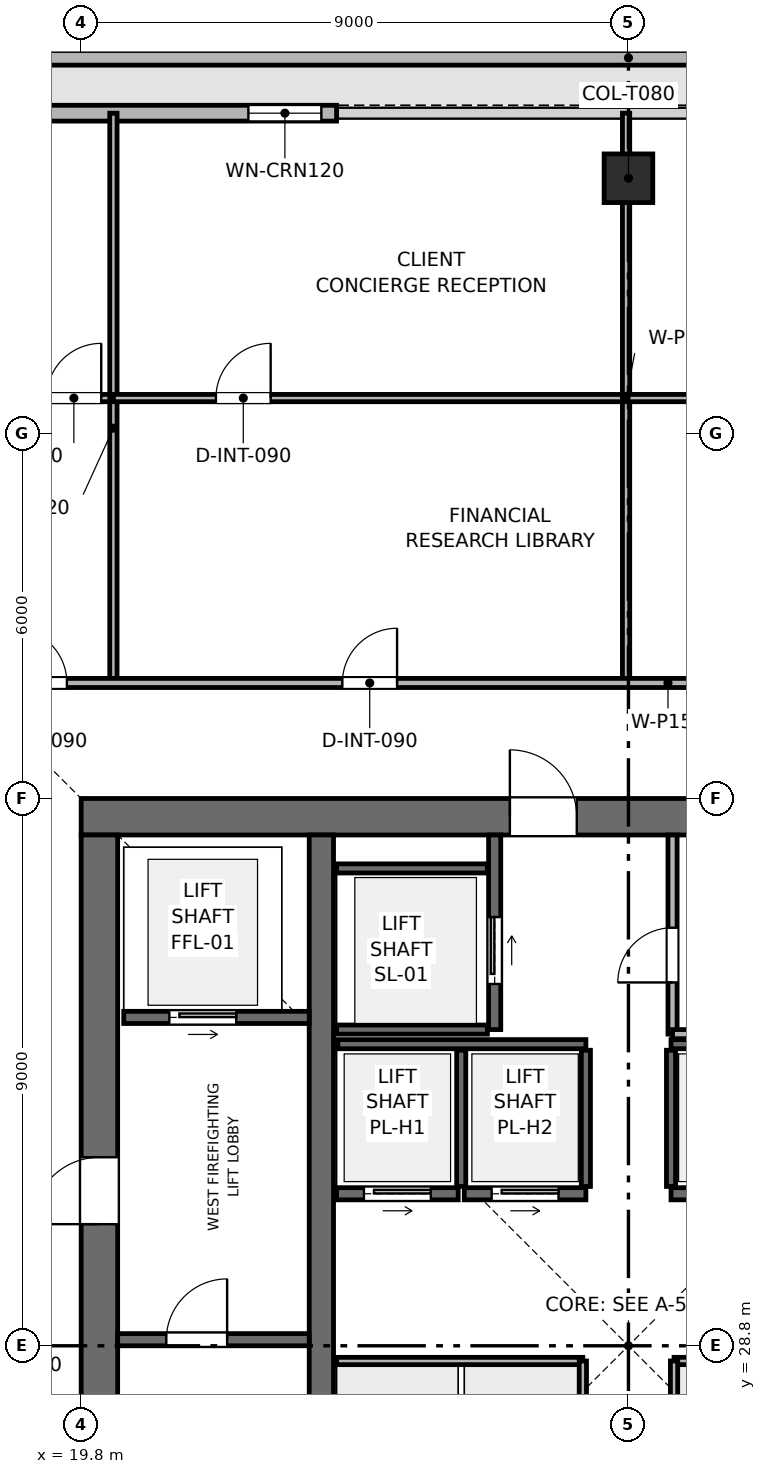
"""IFC4 building model, lengths in metres.
Left out: names, types, materials, properties, quantities, classifications, styles, units other than length and angle.
Written with IfcOpenShell. Run it as: python <this file> out.ifc"""

import sys

from ifc_helpers import new_model, si_unit, direction, frame, frame_2d, origin, origin_2d, place, context, subcontext, project, spatial, rectangle, extrude, element, fill, save


model = new_model("IFC4")
c1 = context("Model", 3, precision=1e-05, world=origin(), true_north=direction((0.0, 1.0)))
c2 = subcontext(c1, "Body", "Model", "MODEL_VIEW")
j1 = project(units=[si_unit("LENGTHUNIT", "METRE"), si_unit("PLANEANGLEUNIT", "RADIAN")], contexts=[c1])
p1 = place(None, origin())
s1 = spatial("IfcSite", under=j1, at=p1, CompositionType="ELEMENT")
p2 = place(p1, origin())
s2 = spatial("IfcBuilding", under=s1, at=p2, CompositionType="ELEMENT")
p3 = place(p2, frame((0.0, 0.0, 355.5)))
s3 = spatial("IfcBuildingStorey", under=s2, at=p3, CompositionType="ELEMENT", Elevation=355.5)
p4 = place(p3, frame((19.8, 37.5, 0.0), z_axis=(0.0, 0.0, 1.0), x_axis=(1.0, 0.0, 0.0)))
e1 = element("IfcWall", 1, at=p4, inside=s3, PredefinedType="SHEAR", context=c2, shape_type="SweptSolid", body=[
    extrude(rectangle(XDim=18.0, YDim=0.6, at=frame_2d((9.0, 0.0))), origin(), (0.0, 0.0, 1.0), 4.5),
])
p5 = place(p4, frame((7.05, 0.0, 0.0)))
e2 = element("IfcOpeningElement", 2, at=p5, cuts=e1, PredefinedType="OPENING", context=c2, shape_type="SweptSolid", body=[
    extrude(rectangle(XDim=1.1, YDim=2.15, at=frame_2d((0.55, 1.075))), frame((0.0, 0.31, 0.0), z_axis=(0.0, -1.0, 0.0), x_axis=(1.0, 0.0, 0.0)), (0.0, 0.0, 1.0), 0.62),
])
p6 = place(p3, frame((20.1, 20.4, 0.0), z_axis=(0.0, 0.0, 1.0), x_axis=(0.0, 1.0, 0.0)))
e3 = element("IfcWall", 3, at=p6, inside=s3, PredefinedType="SHEAR", context=c2, shape_type="SweptSolid", body=[
    extrude(rectangle(XDim=16.8, YDim=0.6, at=frame_2d((8.4, 0.0))), origin(), (0.0, 0.0, 1.0), 4.5),
])
p7 = place(p6, frame((10.4, 0.0, 0.0)))
e4 = element("IfcOpeningElement", 4, at=p7, cuts=e3, PredefinedType="OPENING", context=c2, shape_type="SweptSolid", body=[
    extrude(rectangle(XDim=1.1, YDim=2.15, at=frame_2d((0.55, 1.075))), frame((0.0, 0.31, 0.0), z_axis=(0.0, -1.0, 0.0), x_axis=(1.0, 0.0, 0.0)), (0.0, 0.0, 1.0), 0.62),
])
p8 = place(p3, frame((23.75, 20.4, 0.0), z_axis=(0.0, 0.0, 1.0), x_axis=(0.0, 1.0, 0.0)))
e5 = element("IfcWall", 5, at=p8, inside=s3, PredefinedType="SHEAR", context=c2, shape_type="SweptSolid", body=[
    extrude(rectangle(XDim=16.8, YDim=0.4, at=frame_2d((8.4, 0.0))), origin(), (0.0, 0.0, 1.0), 4.5),
])
p9 = place(p3, frame((28.8, 48.0, 0.003), z_axis=(0.0, 0.0, 1.0), x_axis=(1.0, 0.0, 0.0)))
e6 = element("IfcColumn", 6, at=p9, inside=s3, PredefinedType="COLUMN", context=c2, shape_type="SweptSolid", body=[
    extrude(rectangle(XDim=0.8, YDim=0.8, at=origin_2d()), origin(), (0.0, 0.0, 1.0), 4.234),
])
p10 = place(p3, frame((44.045, 49.98, 0.0), z_axis=(0.0, 0.0, 1.0), x_axis=(-1.0, 0.0, 0.0)))
e7 = element("IfcWall", 7, at=p10, inside=s3, PredefinedType="PARAPET", context=c2, shape_type="SweptSolid", body=[
    extrude(rectangle(XDim=30.49, YDim=0.24, at=frame_2d((15.245, 0.0))), origin(), (0.0, 0.0, 1.0), 1.2),
])
p11 = place(p3, frame((14.0, 49.07, 0.0), z_axis=(0.0, 0.0, 1.0), x_axis=(1.0, 0.0, 0.0)))
e8 = element("IfcWall", 8, at=p11, inside=s3, PredefinedType="SOLIDWALL", context=c2, shape_type="SweptSolid", body=[
    extrude(rectangle(XDim=10.0, YDim=0.26, at=frame_2d((5.0, 0.0))), origin(), (0.0, 0.0, 1.0), 4.24),
])
p12 = place(p11, frame((8.55, 0.0, 0.9)))
e9 = element("IfcOpeningElement", 9, at=p12, cuts=e8, PredefinedType="OPENING", context=c2, shape_type="SweptSolid", body=[
    extrude(rectangle(XDim=1.2, YDim=2.1, at=frame_2d((0.6, 1.05))), frame((0.0, 0.14, 0.0), z_axis=(0.0, -1.0, 0.0), x_axis=(1.0, 0.0, 0.0)), (0.0, 0.0, 1.0), 0.28),
])
p13 = place(p3, frame((20.4, 28.9, 0.0), z_axis=(0.0, 0.0, 1.0), x_axis=(1.0, 0.0, 0.0)))
e10 = element("IfcWall", 10, at=p13, inside=s3, PredefinedType="SHEAR", context=c2, shape_type="SweptSolid", body=[
    extrude(rectangle(XDim=3.15, YDim=0.2, at=frame_2d((1.575, 0.0))), origin(), (0.0, 0.0, 1.0), 4.24),
])
p14 = place(p13, frame((0.8, 0.0, 0.0)))
e11 = element("IfcOpeningElement", 11, at=p14, cuts=e10, PredefinedType="OPENING", context=c2, shape_type="SweptSolid", body=[
    extrude(rectangle(XDim=1.0, YDim=2.1, at=frame_2d((0.5, 1.05))), frame((0.0, 0.11, 0.0), z_axis=(0.0, -1.0, 0.0), x_axis=(1.0, 0.0, 0.0)), (0.0, 0.0, 1.0), 0.22),
])
p15 = place(p3, frame((20.5, 34.2, 0.0), z_axis=(0.0, 0.0, 1.0), x_axis=(1.0, 0.0, 0.0)))
e12 = element("IfcWall", 12, at=p15, inside=s3, PredefinedType="SHEAR", context=c2, shape_type="SweptSolid", body=[
    extrude(rectangle(XDim=3.05, YDim=0.2, at=frame_2d((1.525, 0.0))), origin(), (0.0, 0.0, 1.0), 4.24),
])
p16 = place(p15, frame((0.75, 0.0, 0.0)))
e13 = element("IfcOpeningElement", 13, at=p16, cuts=e12, PredefinedType="OPENING", context=c2, shape_type="SweptSolid", body=[
    extrude(rectangle(XDim=1.1, YDim=2.15, at=frame_2d((0.55, 1.075))), frame((0.0, 0.11, 0.0), z_axis=(0.0, -1.0, 0.0), x_axis=(1.0, 0.0, 0.0)), (0.0, 0.0, 1.0), 0.22),
])
p17 = place(p3, frame((26.6, 34.0, 0.0), z_axis=(0.0, 0.0, 1.0), x_axis=(0.0, 1.0, 0.0)))
e14 = element("IfcWall", 14, at=p17, inside=s3, PredefinedType="SHEAR", context=c2, shape_type="SweptSolid", body=[
    extrude(rectangle(XDim=3.2, YDim=0.2, at=frame_2d((1.6, 0.0))), origin(), (0.0, 0.0, 1.0), 4.24),
])
p18 = place(p17, frame((0.75, 0.0, 0.0)))
e15 = element("IfcOpeningElement", 15, at=p18, cuts=e14, PredefinedType="OPENING", context=c2, shape_type="SweptSolid", body=[
    extrude(rectangle(XDim=1.1, YDim=2.15, at=frame_2d((0.55, 1.075))), frame((0.0, 0.11, 0.0), z_axis=(0.0, -1.0, 0.0), x_axis=(1.0, 0.0, 0.0)), (0.0, 0.0, 1.0), 0.22),
])
for number, where, z_axis, x_axis in (
    (16, (24.0, 34.0, 0.0), (0.0, 0.0, 1.0), (1.0, 0.0, 0.0)),
    (17, (24.0, 36.65, 0.0), (0.0, 0.0, 1.0), (1.0, 0.0, 0.0)),
):
    element("IfcWall", number, at=place(p3, frame(where, z_axis=z_axis, x_axis=x_axis)), inside=s3, PredefinedType="SHEAR", context=c2, shape_type="SweptSolid", body=[
        extrude(rectangle(XDim=2.48, YDim=0.15, at=frame_2d((1.24, 0.0))), origin(), (0.0, 0.0, 1.0), 4.24),
    ])
p19 = place(p3, frame((24.0, 31.3, 0.0), z_axis=(0.0, 0.0, 1.0), x_axis=(1.0, 0.0, 0.0)))
e18 = element("IfcWall", 18, at=p19, inside=s3, PredefinedType="SHEAR", context=c2, shape_type="SweptSolid", body=[
    extrude(rectangle(XDim=2.0, YDim=0.2, at=frame_2d((1.0, 0.0))), origin(), (0.0, 0.0, 1.0), 4.24),
])
p20 = place(p19, frame((0.45, 0.0, 0.0)))
e19 = element("IfcOpeningElement", 19, at=p20, cuts=e18, PredefinedType="OPENING", context=c2, shape_type="SweptSolid", body=[
    extrude(rectangle(XDim=1.1, YDim=2.15, at=frame_2d((0.55, 1.075))), frame((0.0, 0.11, 0.0), z_axis=(0.0, -1.0, 0.0), x_axis=(1.0, 0.0, 0.0)), (0.0, 0.0, 1.0), 0.22),
])
p21 = place(p3, frame((26.1, 31.3, 0.0), z_axis=(0.0, 0.0, 1.0), x_axis=(1.0, 0.0, 0.0)))
e20 = element("IfcWall", 20, at=p21, inside=s3, PredefinedType="SHEAR", context=c2, shape_type="SweptSolid", body=[
    extrude(rectangle(XDim=2.0, YDim=0.2, at=frame_2d((1.0, 0.0))), origin(), (0.0, 0.0, 1.0), 4.24),
])
p22 = place(p21, frame((0.45, 0.0, 0.0)))
e21 = element("IfcOpeningElement", 21, at=p22, cuts=e20, PredefinedType="OPENING", context=c2, shape_type="SweptSolid", body=[
    extrude(rectangle(XDim=1.1, YDim=2.15, at=frame_2d((0.55, 1.075))), frame((0.0, 0.11, 0.0), z_axis=(0.0, -1.0, 0.0), x_axis=(1.0, 0.0, 0.0)), (0.0, 0.0, 1.0), 0.22),
])
p23 = place(p3, frame((29.5, 31.3, 0.0), z_axis=(0.0, 0.0, 1.0), x_axis=(1.0, 0.0, 0.0)))
e22 = element("IfcWall", 22, at=p23, inside=s3, PredefinedType="SHEAR", context=c2, shape_type="SweptSolid", body=[
    extrude(rectangle(XDim=2.0, YDim=0.2, at=frame_2d((1.0, 0.0))), origin(), (0.0, 0.0, 1.0), 4.24),
])
p24 = place(p23, frame((0.45, 0.0, 0.0)))
e23 = element("IfcOpeningElement", 23, at=p24, cuts=e22, PredefinedType="OPENING", context=c2, shape_type="SweptSolid", body=[
    extrude(rectangle(XDim=1.1, YDim=2.15, at=frame_2d((0.55, 1.075))), frame((0.0, 0.11, 0.0), z_axis=(0.0, -1.0, 0.0), x_axis=(1.0, 0.0, 0.0)), (0.0, 0.0, 1.0), 0.22),
])
for number, where, z_axis, x_axis in (
    (24, (24.02, 33.76, 0.0), (0.0, 0.0, 1.0), (1.0, 0.0, 0.0)),
    (25, (29.5, 33.76, 0.0), (0.0, 0.0, 1.0), (1.0, 0.0, 0.0)),
):
    element("IfcWall", number, at=place(p3, frame(where, z_axis=z_axis, x_axis=x_axis)), inside=s3, PredefinedType="SHEAR", context=c2, shape_type="SweptSolid", body=[
        extrude(rectangle(XDim=4.08, YDim=0.15, at=frame_2d((2.04, 0.0))), origin(), (0.0, 0.0, 1.0), 4.24),
    ])
for number, where, z_axis, x_axis in (
    (26, (26.05, 31.42, 0.0), (0.0, 0.0, 1.0), (0.0, 1.0, 0.0)),
    (27, (28.1, 31.42, 0.0), (0.0, 0.0, 1.0), (0.0, 1.0, 0.0)),
    (28, (29.5, 31.42, 0.0), (0.0, 0.0, 1.0), (0.0, 1.0, 0.0)),
):
    element("IfcWall", number, at=place(p3, frame(where, z_axis=z_axis, x_axis=x_axis)), inside=s3, PredefinedType="SHEAR", context=c2, shape_type="SweptSolid", body=[
        extrude(rectangle(XDim=2.24, YDim=0.15, at=frame_2d((1.12, 0.0))), origin(), (0.0, 0.0, 1.0), 4.24),
    ])
p25 = place(p3, frame((29.525, 33.925, 0.0), z_axis=(0.0, 0.0, 1.0), x_axis=(0.0, 1.0, 0.0)))
e29 = element("IfcWall", 29, at=p25, inside=s3, PredefinedType="PARTITIONING", context=c2, shape_type="SweptSolid", body=[
    extrude(rectangle(XDim=3.275, YDim=0.15, at=frame_2d((1.637, 0.0))), origin(), (0.0, 0.0, 1.0), 4.24),
])
p26 = place(p25, frame((0.85, 0.0, 0.0)))
e30 = element("IfcOpeningElement", 30, at=p26, cuts=e29, PredefinedType="OPENING", context=c2, shape_type="SweptSolid", body=[
    extrude(rectangle(XDim=0.9, YDim=2.1, at=frame_2d((0.45, 1.05))), frame((0.0, 0.085, 0.0), z_axis=(0.0, -1.0, 0.0), x_axis=(1.0, 0.0, 0.0)), (0.0, 0.0, 1.0), 0.17),
])
p27 = place(p3, frame((29.525, 33.925, 0.0), z_axis=(0.0, 0.0, 1.0), x_axis=(1.0, 0.0, 0.0)))
e31 = element("IfcWall", 31, at=p27, inside=s3, PredefinedType="PARTITIONING", context=c2, shape_type="SweptSolid", body=[
    extrude(rectangle(XDim=2.625, YDim=0.15, at=frame_2d((1.312, 0.0))), origin(), (0.0, 0.0, 1.0), 4.24),
])
p28 = place(p3, frame((24.0, 28.55, 0.0), z_axis=(0.0, 0.0, 1.0), x_axis=(1.0, 0.0, 0.0)))
e32 = element("IfcWall", 32, at=p28, inside=s3, PredefinedType="PARTITIONING", context=c2, shape_type="SweptSolid", body=[
    extrude(rectangle(XDim=4.05, YDim=0.12, at=frame_2d((2.025, 0.0))), origin(), (0.0, 0.0, 1.0), 4.24),
])
p29 = place(p3, frame((28.05, 25.95, 0.0), z_axis=(0.0, 0.0, 1.0), x_axis=(0.0, 1.0, 0.0)))
e33 = element("IfcWall", 33, at=p29, inside=s3, PredefinedType="PARTITIONING", context=c2, shape_type="SweptSolid", body=[
    extrude(rectangle(XDim=2.6, YDim=0.12, at=frame_2d((1.3, 0.0))), origin(), (0.0, 0.0, 1.0), 4.24),
])
p30 = place(p3, frame((29.55, 28.55, 0.0), z_axis=(0.0, 0.0, 1.0), x_axis=(1.0, 0.0, 0.0)))
e34 = element("IfcWall", 34, at=p30, inside=s3, PredefinedType="PARTITIONING", context=c2, shape_type="SweptSolid", body=[
    extrude(rectangle(XDim=4.05, YDim=0.12, at=frame_2d((2.025, 0.0))), origin(), (0.0, 0.0, 1.0), 4.24),
])
p31 = place(p3, frame((29.55, 25.95, 0.0), z_axis=(0.0, 0.0, 1.0), x_axis=(0.0, 1.0, 0.0)))
e35 = element("IfcWall", 35, at=p31, inside=s3, PredefinedType="PARTITIONING", context=c2, shape_type="SweptSolid", body=[
    extrude(rectangle(XDim=2.6, YDim=0.12, at=frame_2d((1.3, 0.0))), origin(), (0.0, 0.0, 1.0), 4.24),
])
p32 = place(p3, frame((14.0, 44.385, 0.0), z_axis=(0.0, 0.0, 1.0), x_axis=(1.0, 0.0, 0.0)))
e36 = element("IfcWall", 36, at=p32, inside=s3, PredefinedType="PARTITIONING", context=c2, shape_type="SweptSolid", body=[
    extrude(rectangle(XDim=6.33, YDim=0.12, at=frame_2d((3.165, 0.0))), origin(), (0.0, 0.0, 1.0), 3.825),
])
p33 = place(p32, frame((5.23, 0.0, 0.0)))
e37 = element("IfcOpeningElement", 37, at=p33, cuts=e36, PredefinedType="OPENING", context=c2, shape_type="SweptSolid", body=[
    extrude(rectangle(XDim=0.9, YDim=2.1, at=frame_2d((0.45, 1.05))), frame((0.0, 0.07, 0.0), z_axis=(0.0, -1.0, 0.0), x_axis=(1.0, 0.0, 0.0)), (0.0, 0.0, 1.0), 0.14),
])
p34 = place(p3, frame((20.33, 39.7, 0.0), z_axis=(0.0, 0.0, 1.0), x_axis=(0.0, 1.0, 0.0)))
e38 = element("IfcWall", 38, at=p34, inside=s3, PredefinedType="PARTITIONING", context=c2, shape_type="SweptSolid", body=[
    extrude(rectangle(XDim=9.37, YDim=0.12, at=frame_2d((4.685, 0.0))), origin(), (0.0, 0.0, 1.0), 3.825),
])
p35 = place(p3, frame((20.33, 44.385, 0.0), z_axis=(0.0, 0.0, 1.0), x_axis=(1.0, 0.0, 0.0)))
e39 = element("IfcWall", 39, at=p35, inside=s3, PredefinedType="PARTITIONING", context=c2, shape_type="SweptSolid", body=[
    extrude(rectangle(XDim=8.431, YDim=0.12, at=frame_2d((4.215, 0.0))), origin(), (0.0, 0.0, 1.0), 3.825),
])
p36 = place(p35, frame((1.686, 0.0, 0.0)))
e40 = element("IfcOpeningElement", 40, at=p36, cuts=e39, PredefinedType="OPENING", context=c2, shape_type="SweptSolid", body=[
    extrude(rectangle(XDim=0.9, YDim=2.1, at=frame_2d((0.45, 1.05))), frame((0.0, 0.07, 0.0), z_axis=(0.0, -1.0, 0.0), x_axis=(1.0, 0.0, 0.0)), (0.0, 0.0, 1.0), 0.14),
])
p37 = place(p3, frame((28.761, 39.7, 0.0), z_axis=(0.0, 0.0, 1.0), x_axis=(0.0, 1.0, 0.0)))
e41 = element("IfcWall", 41, at=p37, inside=s3, PredefinedType="PARTITIONING", context=c2, shape_type="SweptSolid", body=[
    extrude(rectangle(XDim=9.37, YDim=0.12, at=frame_2d((4.685, 0.0))), origin(), (0.0, 0.0, 1.0), 3.825),
])
p38 = place(p3, frame((28.761, 44.385, 0.0), z_axis=(0.0, 0.0, 1.0), x_axis=(1.0, 0.0, 0.0)))
e42 = element("IfcWall", 42, at=p38, inside=s3, PredefinedType="PARTITIONING", context=c2, shape_type="SweptSolid", body=[
    extrude(rectangle(XDim=14.839, YDim=0.12, at=frame_2d((7.419, 0.0))), origin(), (0.0, 0.0, 1.0), 3.825),
])
p39 = place(p38, frame((5.841, 0.0, 0.0)))
e43 = element("IfcOpeningElement", 43, at=p39, cuts=e42, PredefinedType="OPENING", context=c2, shape_type="SweptSolid", body=[
    extrude(rectangle(XDim=0.9, YDim=2.1, at=frame_2d((0.45, 1.05))), frame((0.0, 0.07, 0.0), z_axis=(0.0, -1.0, 0.0), x_axis=(1.0, 0.0, 0.0)), (0.0, 0.0, 1.0), 0.14),
])
p40 = place(p3, frame((17.9, 39.7, 0.0), z_axis=(0.0, 0.0, 1.0), x_axis=(1.0, 0.0, 0.0)))
e44 = element("IfcWall", 44, at=p40, inside=s3, PredefinedType="PARTITIONING", context=c2, shape_type="SweptSolid", body=[
    extrude(rectangle(XDim=21.8, YDim=0.15, at=frame_2d((10.9, 0.0))), origin(), (0.0, 0.0, 1.0), 3.825),
])
p41 = place(p40, frame((0.765, 0.0, 0.0)))
e45 = element("IfcOpeningElement", 45, at=p41, cuts=e44, PredefinedType="OPENING", context=c2, shape_type="SweptSolid", body=[
    extrude(rectangle(XDim=0.9, YDim=2.1, at=frame_2d((0.45, 1.05))), frame((0.0, 0.085, 0.0), z_axis=(0.0, -1.0, 0.0), x_axis=(1.0, 0.0, 0.0)), (0.0, 0.0, 1.0), 0.17),
])
p42 = place(p40, frame((6.195, 0.0, 0.0)))
e46 = element("IfcOpeningElement", 46, at=p42, cuts=e44, PredefinedType="OPENING", context=c2, shape_type="SweptSolid", body=[
    extrude(rectangle(XDim=0.9, YDim=2.1, at=frame_2d((0.45, 1.05))), frame((0.0, 0.085, 0.0), z_axis=(0.0, -1.0, 0.0), x_axis=(1.0, 0.0, 0.0)), (0.0, 0.0, 1.0), 0.17),
])
p43 = place(p40, frame((15.88, 0.0, 0.0)))
e47 = element("IfcOpeningElement", 47, at=p43, cuts=e44, PredefinedType="OPENING", context=c2, shape_type="SweptSolid", body=[
    extrude(rectangle(XDim=0.9, YDim=2.1, at=frame_2d((0.45, 1.05))), frame((0.0, 0.085, 0.0), z_axis=(0.0, -1.0, 0.0), x_axis=(1.0, 0.0, 0.0)), (0.0, 0.0, 1.0), 0.17),
])
p44 = place(p12, origin())
e48 = element("IfcWindow", 48, at=p44, inside=s3, PartitioningType="SINGLE_PANEL", PredefinedType="WINDOW", context=c2, shape_type="SweptSolid", body=[
    extrude(rectangle(XDim=1.2, YDim=2.1, at=frame_2d((0.6, 1.05))), frame((0.0, 0.03, 0.0), z_axis=(0.0, -1.0, 0.0), x_axis=(1.0, 0.0, 0.0)), (0.0, 0.0, 1.0), 0.06),
])
fill(e9, e48)
p45 = place(p14, origin())
e49 = element("IfcDoor", 49, at=p45, inside=s3, OperationType="SINGLE_SWING_RIGHT", PredefinedType="DOOR", context=c2, shape_type="SweptSolid", body=[
    extrude(rectangle(XDim=1.0, YDim=2.1, at=frame_2d((0.5, 1.05))), frame((0.0, 0.025, 0.0), z_axis=(0.0, -1.0, 0.0), x_axis=(1.0, 0.0, 0.0)), (0.0, 0.0, 1.0), 0.05),
])
fill(e11, e49)
p46 = place(p16, origin())
e50 = element("IfcDoor", 50, at=p46, inside=s3, OperationType="SLIDING_TO_RIGHT", PredefinedType="DOOR", context=c2, shape_type="SweptSolid", body=[
    extrude(rectangle(XDim=1.1, YDim=2.15, at=frame_2d((0.55, 1.075))), frame((0.0, 0.025, 0.0), z_axis=(0.0, -1.0, 0.0), x_axis=(1.0, 0.0, 0.0)), (0.0, 0.0, 1.0), 0.05),
])
fill(e13, e50)
p47 = place(p18, origin())
e51 = element("IfcDoor", 51, at=p47, inside=s3, OperationType="SLIDING_TO_RIGHT", PredefinedType="DOOR", context=c2, shape_type="SweptSolid", body=[
    extrude(rectangle(XDim=1.1, YDim=2.15, at=frame_2d((0.55, 1.075))), frame((0.0, 0.025, 0.0), z_axis=(0.0, -1.0, 0.0), x_axis=(1.0, 0.0, 0.0)), (0.0, 0.0, 1.0), 0.05),
])
fill(e15, e51)
p48 = place(p20, origin())
e52 = element("IfcDoor", 52, at=p48, inside=s3, OperationType="SLIDING_TO_RIGHT", PredefinedType="DOOR", context=c2, shape_type="SweptSolid", body=[
    extrude(rectangle(XDim=1.1, YDim=2.15, at=frame_2d((0.55, 1.075))), frame((0.0, 0.025, 0.0), z_axis=(0.0, -1.0, 0.0), x_axis=(1.0, 0.0, 0.0)), (0.0, 0.0, 1.0), 0.05),
])
fill(e19, e52)
p49 = place(p22, origin())
e53 = element("IfcDoor", 53, at=p49, inside=s3, OperationType="SLIDING_TO_RIGHT", PredefinedType="DOOR", context=c2, shape_type="SweptSolid", body=[
    extrude(rectangle(XDim=1.1, YDim=2.15, at=frame_2d((0.55, 1.075))), frame((0.0, 0.025, 0.0), z_axis=(0.0, -1.0, 0.0), x_axis=(1.0, 0.0, 0.0)), (0.0, 0.0, 1.0), 0.05),
])
fill(e21, e53)
p50 = place(p26, origin())
e54 = element("IfcDoor", 54, at=p50, inside=s3, OperationType="SINGLE_SWING_LEFT", PredefinedType="DOOR", context=c2, shape_type="SweptSolid", body=[
    extrude(rectangle(XDim=0.9, YDim=2.1, at=frame_2d((0.45, 1.05))), frame((0.0, 0.025, 0.0), z_axis=(0.0, -1.0, 0.0), x_axis=(1.0, 0.0, 0.0)), (0.0, 0.0, 1.0), 0.05),
])
fill(e30, e54)
p51 = place(p33, origin())
e55 = element("IfcDoor", 55, at=p51, inside=s3, OperationType="SINGLE_SWING_RIGHT", PredefinedType="DOOR", context=c2, shape_type="SweptSolid", body=[
    extrude(rectangle(XDim=0.9, YDim=2.1, at=frame_2d((0.45, 1.05))), frame((0.0, 0.025, 0.0), z_axis=(0.0, -1.0, 0.0), x_axis=(1.0, 0.0, 0.0)), (0.0, 0.0, 1.0), 0.05),
])
fill(e37, e55)
p52 = place(p36, origin())
e56 = element("IfcDoor", 56, at=p52, inside=s3, OperationType="SINGLE_SWING_RIGHT", PredefinedType="DOOR", context=c2, shape_type="SweptSolid", body=[
    extrude(rectangle(XDim=0.9, YDim=2.1, at=frame_2d((0.45, 1.05))), frame((0.0, 0.025, 0.0), z_axis=(0.0, -1.0, 0.0), x_axis=(1.0, 0.0, 0.0)), (0.0, 0.0, 1.0), 0.05),
])
fill(e40, e56)
p53 = place(p41, origin())
e57 = element("IfcDoor", 57, at=p53, inside=s3, OperationType="SINGLE_SWING_LEFT", PredefinedType="DOOR", context=c2, shape_type="SweptSolid", body=[
    extrude(rectangle(XDim=0.9, YDim=2.1, at=frame_2d((0.45, 1.05))), frame((0.0, 0.025, 0.0), z_axis=(0.0, -1.0, 0.0), x_axis=(1.0, 0.0, 0.0)), (0.0, 0.0, 1.0), 0.05),
])
fill(e45, e57)
p54 = place(p42, origin())
e58 = element("IfcDoor", 58, at=p54, inside=s3, OperationType="SINGLE_SWING_RIGHT", PredefinedType="DOOR", context=c2, shape_type="SweptSolid", body=[
    extrude(rectangle(XDim=0.9, YDim=2.1, at=frame_2d((0.45, 1.05))), frame((0.0, 0.025, 0.0), z_axis=(0.0, -1.0, 0.0), x_axis=(1.0, 0.0, 0.0)), (0.0, 0.0, 1.0), 0.05),
])
fill(e46, e58)
p55 = place(p7, origin())
e59 = element("IfcDoor", 59, at=p55, inside=s3, OperationType="SINGLE_SWING_LEFT", PredefinedType="DOOR", context=c2, shape_type="SweptSolid", body=[
    extrude(rectangle(XDim=1.1, YDim=2.15, at=frame_2d((0.55, 1.075))), frame((0.0, 0.025, 0.0), z_axis=(0.0, -1.0, 0.0), x_axis=(1.0, 0.0, 0.0)), (0.0, 0.0, 1.0), 0.05),
])
fill(e4, e59)
p56 = place(p5, origin())
e60 = element("IfcDoor", 60, at=p56, inside=s3, OperationType="SINGLE_SWING_LEFT", PredefinedType="DOOR", context=c2, shape_type="SweptSolid", body=[
    extrude(rectangle(XDim=1.1, YDim=2.15, at=frame_2d((0.55, 1.075))), frame((0.0, 0.025, 0.0), z_axis=(0.0, -1.0, 0.0), x_axis=(1.0, 0.0, 0.0)), (0.0, 0.0, 1.0), 0.05),
])
fill(e2, e60)
save(model, sys.argv[1])
